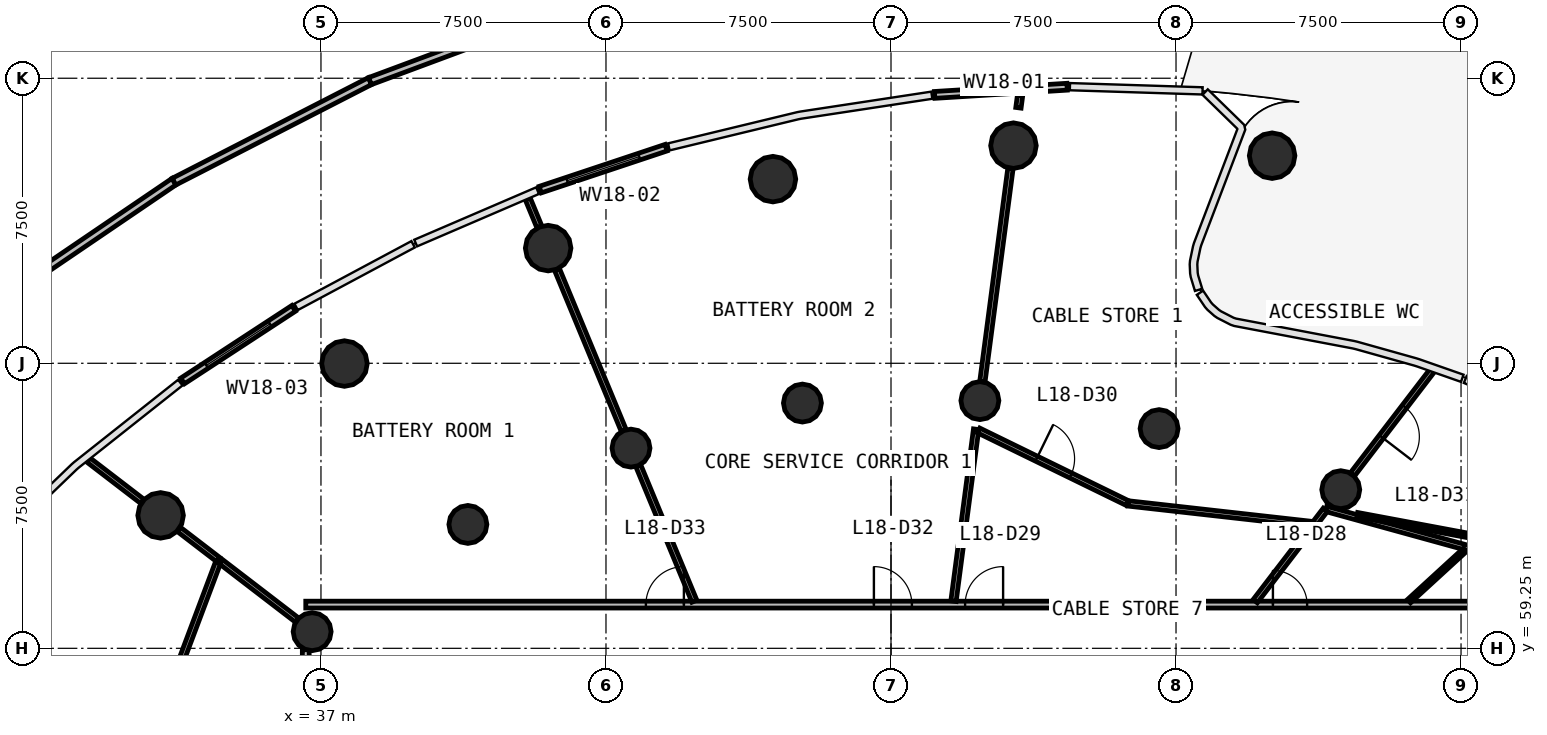
"""IFC4 building model, lengths in metres.
Left out: names, types, materials, properties, quantities, classifications, styles, units other than length and angle.
Written with IfcOpenShell. Run it as: python <this file> out.ifc"""

import sys

from ifc_helpers import new_model, si_unit, direction, frame, frame_2d, origin, origin_2d, place, context, subcontext, project, spatial, rectangle, circle, extrude, source, transform, mapped, element, fill, save


model = new_model("IFC4")
c1 = context("Model", 3, precision=1e-05, world=origin(), true_north=direction((0.0, 1.0)))
c2 = subcontext(c1, "Body", "Model", "MODEL_VIEW")
j1 = project(units=[si_unit("LENGTHUNIT", "METRE"), si_unit("PLANEANGLEUNIT", "RADIAN")], contexts=[c1])
p1 = place(None, origin())
s1 = spatial("IfcSite", under=j1, at=p1, CompositionType="ELEMENT")
p2 = place(p1, origin())
s2 = spatial("IfcBuilding", under=s1, at=p2, CompositionType="ELEMENT")
p3 = place(p2, frame((0.0, 0.0, 79.8)))
s3 = spatial("IfcBuildingStorey", under=s2, at=p3, CompositionType="ELEMENT", Elevation=79.8)
m1 = source(origin(), c2, "Body", "SweptSolid", [
    extrude(circle(Radius=0.6, at=origin_2d()), origin(), (0.0, 0.0, 1.0), 4.5),
])
for number, where, z_axis, x_axis in (
    (1, (62.029, 72.212, -0.4), (0.0, 0.0, 1.0), (1.0, 0.0, 0.0)),
    (2, (55.222, 72.477, -0.4), (0.0, 0.0, 1.0), (1.0, 0.0, 0.0)),
    (3, (48.894, 71.595, -0.4), (0.0, 0.0, 1.0), (1.0, 0.0, 0.0)),
    (4, (42.978, 69.781, -0.4), (0.0, 0.0, 1.0), (1.0, 0.0, 0.0)),
    (5, (37.618, 66.743, -0.4), (0.0, 0.0, 1.0), (1.0, 0.0, 0.0)),
    (6, (32.78, 62.748, -0.4), (0.0, 0.0, 1.0), (1.0, 0.0, 0.0)),
):
    element("IfcColumn", number, at=place(p3, frame(where, z_axis=z_axis, x_axis=x_axis)), inside=s3, PredefinedType="COLUMN", context=c2, shape_type="MappedRepresentation", body=[
        mapped(m1, transform((0.0, 0.0, 0.0), scale=1.0)),
    ])
m2 = source(origin(), c2, "Body", "SweptSolid", [
    extrude(circle(Radius=0.5, at=origin_2d()), origin(), (0.0, 0.0, 1.0), 4.1),
])
for number, where, z_axis, x_axis in (
    (7, (63.835, 63.424, 0.0), (0.0, 0.0, 1.0), (1.0, 0.0, 0.0)),
    (8, (59.055, 65.031, 0.0), (0.0, 0.0, 1.0), (1.0, 0.0, 0.0)),
    (9, (54.339, 65.767, 0.0), (0.0, 0.0, 1.0), (1.0, 0.0, 0.0)),
    (10, (49.669, 65.703, 0.0), (0.0, 0.0, 1.0), (1.0, 0.0, 0.0)),
    (11, (45.158, 64.518, 0.0), (0.0, 0.0, 1.0), (1.0, 0.0, 0.0)),
    (12, (40.866, 62.51, 0.0), (0.0, 0.0, 1.0), (1.0, 0.0, 0.0)),
    (13, (36.768, 59.688, 0.0), (0.0, 0.0, 1.0), (1.0, 0.0, 0.0)),
):
    element("IfcColumn", number, at=place(p3, frame(where, z_axis=z_axis, x_axis=x_axis)), inside=s3, PredefinedType="COLUMN", context=c2, shape_type="MappedRepresentation", body=[
        mapped(m2, transform((0.0, 0.0, 0.0), scale=1.0)),
    ])
p4 = place(p3, frame((56.634, 74.027, 0.0), z_axis=(0.0, 0.0, 1.0), x_axis=(-0.998087787894, -0.061812358449, 0.0)))
e14 = element("IfcWall", 14, at=p4, inside=s3, PredefinedType="STANDARD", context=c2, shape_type="SweptSolid", body=[
    extrude(rectangle(XDim=3.491, YDim=0.18, at=frame_2d((1.746, 0.0))), origin(), (0.0, 0.0, 1.0), 3.448),
])
p5 = place(p4, frame((0.746, 0.0, 0.9)))
e15 = element("IfcOpeningElement", 15, at=p5, cuts=e14, PredefinedType="OPENING", context=c2, shape_type="SweptSolid", body=[
    extrude(rectangle(XDim=2.0, YDim=2.2, at=frame_2d((1.0, 1.1))), frame((0.0, 0.1, 0.0), z_axis=(0.0, -1.0, 0.0), x_axis=(1.0, 0.0, 0.0)), (0.0, 0.0, 1.0), 0.2),
])
p6 = place(p3, frame((46.083, 72.423, 0.0), z_axis=(0.0, 0.0, 1.0), x_axis=(-0.948697281458, -0.316185812703, 0.0)))
e16 = element("IfcWall", 16, at=p6, inside=s3, PredefinedType="STANDARD", context=c2, shape_type="SweptSolid", body=[
    extrude(rectangle(XDim=3.492, YDim=0.18, at=frame_2d((1.746, 0.0))), origin(), (0.0, 0.0, 1.0), 3.7),
])
p7 = place(p6, frame((0.746, 0.0, 0.9)))
e17 = element("IfcOpeningElement", 17, at=p7, cuts=e16, PredefinedType="OPENING", context=c2, shape_type="SweptSolid", body=[
    extrude(rectangle(XDim=2.0, YDim=2.2, at=frame_2d((1.0, 1.1))), frame((0.0, 0.1, 0.0), z_axis=(0.0, -1.0, 0.0), x_axis=(1.0, 0.0, 0.0)), (0.0, 0.0, 1.0), 0.2),
])
p8 = place(p3, frame((36.282, 68.195, 0.0), z_axis=(0.0, 0.0, 1.0), x_axis=(-0.837092769451, -0.547060961258, 0.0)))
e18 = element("IfcWall", 18, at=p8, inside=s3, PredefinedType="STANDARD", context=c2, shape_type="SweptSolid", body=[
    extrude(rectangle(XDim=3.492, YDim=0.18, at=frame_2d((1.746, 0.0))), origin(), (0.0, 0.0, 1.0), 3.7),
])
p9 = place(p8, frame((0.746, 0.0, 0.9)))
e19 = element("IfcOpeningElement", 19, at=p9, cuts=e18, PredefinedType="OPENING", context=c2, shape_type="SweptSolid", body=[
    extrude(rectangle(XDim=2.0, YDim=2.2, at=frame_2d((1.0, 1.1))), frame((0.0, 0.1, 0.0), z_axis=(0.0, -1.0, 0.0), x_axis=(1.0, 0.0, 0.0)), (0.0, 0.0, 1.0), 0.2),
])
p10 = place(p3, frame((28.339, 68.272, 0.0), z_axis=(0.0, 0.0, 1.0), x_axis=(0.827164601212, 0.561959716085, 0.0)))
e20 = element("IfcWall", 20, at=p10, inside=s3, PredefinedType="PARAPET", context=c2, shape_type="SweptSolid", body=[
    extrude(rectangle(XDim=5.796, YDim=0.2, at=frame_2d((2.898, 0.0))), origin(), (0.0, 0.0, 1.0), 1.1),
])
p11 = place(p3, frame((33.133, 71.53, 0.0), z_axis=(0.0, 0.0, 1.0), x_axis=(0.889780183945, 0.456389334077, 0.0)))
e21 = element("IfcWall", 21, at=p11, inside=s3, PredefinedType="PARAPET", context=c2, shape_type="SweptSolid", body=[
    extrude(rectangle(XDim=5.796, YDim=0.2, at=frame_2d((2.898, 0.0))), origin(), (0.0, 0.0, 1.0), 1.1),
])
p12 = place(p3, frame((38.291, 74.175, 0.0), z_axis=(0.0, 0.0, 1.0), x_axis=(0.937325857348, 0.348454067486, 0.0)))
e22 = element("IfcWall", 22, at=p12, inside=s3, PredefinedType="PARAPET", context=c2, shape_type="SweptSolid", body=[
    extrude(rectangle(XDim=5.796, YDim=0.2, at=frame_2d((2.898, 0.0))), origin(), (0.0, 0.0, 1.0), 1.1),
])
p13 = place(p3, frame((36.6, 60.4, 0.0), z_axis=(0.0, 0.0, 1.0), x_axis=(1.0, 0.0, 0.0)))
e23 = element("IfcWall", 23, at=p13, inside=s3, PredefinedType="PARTITIONING", context=c2, shape_type="SweptSolid", body=[
    extrude(rectangle(XDim=30.8, YDim=0.18, at=frame_2d((15.4, 0.0))), origin(), (0.0, 0.0, 1.0), 2.9),
])
p14 = place(p13, frame((25.45, 0.0, 0.0)))
e24 = element("IfcOpeningElement", 24, at=p14, cuts=e23, PredefinedType="OPENING", context=c2, shape_type="SweptSolid", body=[
    extrude(rectangle(XDim=0.9, YDim=2.1, at=frame_2d((0.45, 1.05))), frame((0.0, 0.1, 0.0), z_axis=(0.0, -1.0, 0.0), x_axis=(1.0, 0.0, 0.0)), (0.0, 0.0, 1.0), 0.2),
])
p15 = place(p13, frame((17.35, 0.0, 0.0)))
e25 = element("IfcOpeningElement", 25, at=p15, cuts=e23, PredefinedType="OPENING", context=c2, shape_type="SweptSolid", body=[
    extrude(rectangle(XDim=1.0, YDim=2.1, at=frame_2d((0.5, 1.05))), frame((0.0, 0.1, 0.0), z_axis=(0.0, -1.0, 0.0), x_axis=(1.0, 0.0, 0.0)), (0.0, 0.0, 1.0), 0.2),
])
p16 = place(p13, frame((14.95, 0.0, 0.0)))
e26 = element("IfcOpeningElement", 26, at=p16, cuts=e23, PredefinedType="OPENING", context=c2, shape_type="SweptSolid", body=[
    extrude(rectangle(XDim=1.0, YDim=2.1, at=frame_2d((0.5, 1.05))), frame((0.0, 0.1, 0.0), z_axis=(0.0, -1.0, 0.0), x_axis=(1.0, 0.0, 0.0)), (0.0, 0.0, 1.0), 0.2),
])
p17 = place(p13, frame((8.95, 0.0, 0.0)))
e27 = element("IfcOpeningElement", 27, at=p17, cuts=e23, PredefinedType="OPENING", context=c2, shape_type="SweptSolid", body=[
    extrude(rectangle(XDim=1.0, YDim=2.1, at=frame_2d((0.5, 1.05))), frame((0.0, 0.1, 0.0), z_axis=(0.0, -1.0, 0.0), x_axis=(1.0, 0.0, 0.0)), (0.0, 0.0, 1.0), 0.2),
])
p18 = place(p3, frame((36.6, 35.63, 0.0), z_axis=(0.0, 0.0, 1.0), x_axis=(0.0, 1.0, 0.0)))
e28 = element("IfcWall", 28, at=p18, inside=s3, PredefinedType="PARTITIONING", context=c2, shape_type="SweptSolid", body=[
    extrude(rectangle(XDim=23.583, YDim=0.18, at=frame_2d((11.791, 0.0))), origin(), (0.0, 0.0, 1.0), 2.9),
])
p19 = place(p18, frame((11.333, 0.0, 0.0)))
e29 = element("IfcOpeningElement", 29, at=p19, cuts=e28, PredefinedType="OPENING", context=c2, shape_type="SweptSolid", body=[
    extrude(rectangle(XDim=1.0, YDim=2.1, at=frame_2d((0.5, 1.05))), frame((0.0, 0.1, 0.0), z_axis=(0.0, -1.0, 0.0), x_axis=(1.0, 0.0, 0.0)), (0.0, 0.0, 1.0), 0.2),
])
p20 = place(p18, frame((4.532, 0.0, 0.0)))
e30 = element("IfcOpeningElement", 30, at=p20, cuts=e28, PredefinedType="OPENING", context=c2, shape_type="SweptSolid", body=[
    extrude(rectangle(XDim=1.0, YDim=2.1, at=frame_2d((0.5, 1.05))), frame((0.0, 0.1, 0.0), z_axis=(0.0, -1.0, 0.0), x_axis=(1.0, 0.0, 0.0)), (0.0, 0.0, 1.0), 0.2),
])
p21 = place(p3, frame((69.33, 61.298, 0.0), z_axis=(0.0, 0.0, 1.0), x_axis=(-0.964096881201, 0.265550755334, 0.0)))
e31 = element("IfcWall", 31, at=p21, inside=s3, PredefinedType="PARTITIONING", context=c2, shape_type="SweptSolid", body=[
    extrude(rectangle(XDim=6.102, YDim=0.14, at=frame_2d((3.051, 0.0))), origin(), (0.0, 0.0, 1.0), 2.9),
])
p22 = place(p3, frame((34.315, 61.57, 0.0), z_axis=(0.0, 0.0, 1.0), x_axis=(-0.351670300138, -0.936123923421, 0.0)))
e32 = element("IfcWall", 32, at=p22, inside=s3, PredefinedType="PARTITIONING", context=c2, shape_type="SweptSolid", body=[
    extrude(rectangle(XDim=5.772, YDim=0.14, at=frame_2d((2.886, 0.0))), origin(), (0.0, 0.0, 1.0), 2.9),
])
p23 = place(p3, frame((54.405, 66.267, 0.0), z_axis=(0.0, 0.0, 1.0), x_axis=(0.130510314557, 0.991446951578, 0.0)))
e33 = element("IfcWall", 33, at=p23, inside=s3, PredefinedType="PARTITIONING", context=c2, shape_type="SweptSolid", body=[
    extrude(rectangle(XDim=5.659, YDim=0.14, at=frame_2d((2.829, 0.0))), origin(), (0.0, 0.0, 1.0), 2.9),
])
p24 = place(p3, frame((63.136, 62.513, 0.0), z_axis=(0.0, 0.0, 1.0), x_axis=(-0.993761689461, 0.111524457223, 0.0)))
e34 = element("IfcWall", 34, at=p24, inside=s3, PredefinedType="PARTITIONING", context=c2, shape_type="SweptSolid", body=[
    extrude(rectangle(XDim=4.928, YDim=0.14, at=frame_2d((2.464, 0.0))), origin(), (0.0, 0.0, 1.0), 2.9),
])
p25 = place(p3, frame((53.644, 60.49, 0.0), z_axis=(0.0, 0.0, 1.0), x_axis=(0.130530623125, 0.991444278024, 0.0)))
e35 = element("IfcWall", 35, at=p25, inside=s3, PredefinedType="PARTITIONING", context=c2, shape_type="SweptSolid", body=[
    extrude(rectangle(XDim=4.564, YDim=0.14, at=frame_2d((2.282, 0.0))), origin(), (0.0, 0.0, 1.0), 2.9),
])
p26 = place(p3, frame((44.965, 64.984, 0.0), z_axis=(0.0, 0.0, 1.0), x_axis=(-0.382705930348, 0.923870213221, 0.0)))
e36 = element("IfcWall", 36, at=p26, inside=s3, PredefinedType="PARTITIONING", context=c2, shape_type="SweptSolid", body=[
    extrude(rectangle(XDim=4.587, YDim=0.14, at=frame_2d((2.293, 0.0))), origin(), (0.0, 0.0, 1.0), 2.9),
])
p27 = place(p3, frame((54.306, 64.982, 0.0), z_axis=(0.0, 0.0, 1.0), x_axis=(0.898688532704, -0.438587415673, 0.0)))
e37 = element("IfcWall", 37, at=p27, inside=s3, PredefinedType="PARTITIONING", context=c2, shape_type="SweptSolid", body=[
    extrude(rectangle(XDim=4.346, YDim=0.14, at=frame_2d((2.173, 0.0))), origin(), (0.0, 0.0, 1.0), 2.9),
])
p28 = place(p27, frame((1.696, 0.0, 0.0)))
e38 = element("IfcOpeningElement", 38, at=p28, cuts=e37, PredefinedType="OPENING", context=c2, shape_type="SweptSolid", body=[
    extrude(rectangle(XDim=1.0, YDim=2.1, at=frame_2d((0.5, 1.05))), frame((0.0, 0.08, 0.0), z_axis=(0.0, -1.0, 0.0), x_axis=(1.0, 0.0, 0.0)), (0.0, 0.0, 1.0), 0.16),
])
p29 = place(p3, frame((46.826, 60.49, 0.0), z_axis=(0.0, 0.0, 1.0), x_axis=(-0.382644558062, 0.923895633817, 0.0)))
e39 = element("IfcWall", 39, at=p29, inside=s3, PredefinedType="PARTITIONING", context=c2, shape_type="SweptSolid", body=[
    extrude(rectangle(XDim=3.854, YDim=0.14, at=frame_2d((1.927, 0.0))), origin(), (0.0, 0.0, 1.0), 2.9),
])
p30 = place(p3, frame((66.251, 66.572, 0.0), z_axis=(0.0, 0.0, 1.0), x_axis=(-0.608759983823, -0.793354449219, 0.0)))
e40 = element("IfcWall", 40, at=p30, inside=s3, PredefinedType="PARTITIONING", context=c2, shape_type="SweptSolid", body=[
    extrude(rectangle(XDim=3.464, YDim=0.14, at=frame_2d((1.732, 0.0))), origin(), (0.0, 0.0, 1.0), 2.9),
])
p31 = place(p30, frame((1.214, 0.0, 0.0)))
e41 = element("IfcOpeningElement", 41, at=p31, cuts=e40, PredefinedType="OPENING", context=c2, shape_type="SweptSolid", body=[
    extrude(rectangle(XDim=1.0, YDim=2.1, at=frame_2d((0.5, 1.05))), frame((0.0, 0.08, 0.0), z_axis=(0.0, -1.0, 0.0), x_axis=(1.0, 0.0, 0.0)), (0.0, 0.0, 1.0), 0.16),
])
p32 = place(p3, frame((61.584, 60.49, 0.0), z_axis=(0.0, 0.0, 1.0), x_axis=(0.608715994439, 0.793388201396, 0.0)))
e42 = element("IfcWall", 42, at=p32, inside=s3, PredefinedType="PARTITIONING", context=c2, shape_type="SweptSolid", body=[
    extrude(rectangle(XDim=2.468, YDim=0.14, at=frame_2d((1.234, 0.0))), origin(), (0.0, 0.0, 1.0), 2.9),
])
p33 = place(p3, frame((36.367, 59.995, 0.0), z_axis=(0.0, 0.0, 1.0), x_axis=(-0.793342057606, 0.608776132609, 0.0)))
e43 = element("IfcWall", 43, at=p33, inside=s3, PredefinedType="PARTITIONING", context=c2, shape_type="SweptSolid", body=[
    extrude(rectangle(XDim=2.513, YDim=0.14, at=frame_2d((1.257, 0.0))), origin(), (0.0, 0.0, 1.0), 2.9),
])
p34 = place(p3, frame((32.301, 63.116, 0.0), z_axis=(0.0, 0.0, 1.0), x_axis=(-0.793353764311, 0.608760876415, 0.0)))
e44 = element("IfcWall", 44, at=p34, inside=s3, PredefinedType="PARTITIONING", context=c2, shape_type="SweptSolid", body=[
    extrude(rectangle(XDim=1.79, YDim=0.14, at=frame_2d((0.895, 0.0))), origin(), (0.0, 0.0, 1.0), 2.9),
])
p35 = place(p3, frame((34.292, 61.588, 0.0), z_axis=(0.0, 0.0, 1.0), x_axis=(-0.793397863959, 0.608703400241, 0.0)))
e45 = element("IfcWall", 45, at=p35, inside=s3, PredefinedType="PARTITIONING", context=c2, shape_type="SweptSolid", body=[
    extrude(rectangle(XDim=1.301, YDim=0.14, at=frame_2d((0.65, 0.0))), origin(), (0.0, 0.0, 1.0), 2.9),
])
p36 = place(p3, frame((55.354, 73.473, 0.0), z_axis=(0.0, 0.0, 1.0), x_axis=(0.130608081992, 0.99143407694, 0.0)))
e46 = element("IfcWall", 46, at=p36, inside=s3, PredefinedType="PARTITIONING", context=c2, shape_type="SweptSolid", body=[
    extrude(rectangle(XDim=0.329, YDim=0.14, at=frame_2d((0.165, 0.0))), origin(), (0.0, 0.0, 1.0), 2.9),
])
p37 = place(p3, frame((42.747, 70.34, 0.0), z_axis=(0.0, 0.0, 1.0), x_axis=(-0.38272164666, 0.923863702706, 0.0)))
e47 = element("IfcWall", 47, at=p37, inside=s3, PredefinedType="PARTITIONING", context=c2, shape_type="SweptSolid", body=[
    extrude(rectangle(XDim=0.797, YDim=0.14, at=frame_2d((0.398, 0.0))), origin(), (0.0, 0.0, 1.0), 2.9),
])
p38 = place(p3, frame((63.155, 62.537, 0.0), z_axis=(0.0, 0.0, 1.0), x_axis=(0.608795024316, 0.793327560575, 0.0)))
e48 = element("IfcWall", 48, at=p38, inside=s3, PredefinedType="PARTITIONING", context=c2, shape_type="SweptSolid", body=[
    extrude(rectangle(XDim=0.451, YDim=0.14, at=frame_2d((0.226, 0.0))), origin(), (0.0, 0.0, 1.0), 2.9),
])
p39 = place(p3, frame((67.461, 62.168, 0.0), z_axis=(0.0, 0.0, 1.0), x_axis=(-0.982952931866, 0.183857373354, 0.0)))
e49 = element("IfcWall", 49, at=p39, inside=s3, PredefinedType="PARTITIONING", context=c2, shape_type="SweptSolid", body=[
    extrude(rectangle(XDim=3.248, YDim=0.12, at=frame_2d((1.624, 0.0))), origin(), (0.0, 0.0, 1.0), 2.9),
])
p40 = place(p3, frame((65.63, 60.49, 0.0), z_axis=(0.0, 0.0, 1.0), x_axis=(0.737245484637, 0.675624966518, 0.0)))
e50 = element("IfcWall", 50, at=p40, inside=s3, PredefinedType="PARTITIONING", context=c2, shape_type="SweptSolid", body=[
    extrude(rectangle(XDim=1.997, YDim=0.12, at=frame_2d((0.999, 0.0))), origin(), (0.0, 0.0, 1.0), 2.9),
])
m3 = source(origin(), c2, "Body", "SweptSolid", [
    extrude(rectangle(XDim=2.0, YDim=2.2, at=frame_2d((1.0, 1.1))), frame((0.0, 0.03, 0.0), z_axis=(0.0, -1.0, 0.0), x_axis=(1.0, 0.0, 0.0)), (0.0, 0.0, 1.0), 0.06),
])
p41 = place(p5, origin())
e51 = element("IfcWindow", 51, at=p41, inside=s3, PartitioningType="SINGLE_PANEL", PredefinedType="WINDOW", context=c2, shape_type="MappedRepresentation", body=[
    mapped(m3, transform((0.0, 0.0, 0.0), scale=1.0)),
])
fill(e15, e51)
p42 = place(p7, origin())
e52 = element("IfcWindow", 52, at=p42, inside=s3, PartitioningType="SINGLE_PANEL", PredefinedType="WINDOW", context=c2, shape_type="MappedRepresentation", body=[
    mapped(m3, transform((0.0, 0.0, 0.0), scale=1.0)),
])
fill(e17, e52)
p43 = place(p9, origin())
e53 = element("IfcWindow", 53, at=p43, inside=s3, PartitioningType="SINGLE_PANEL", PredefinedType="WINDOW", context=c2, shape_type="MappedRepresentation", body=[
    mapped(m3, transform((0.0, 0.0, 0.0), scale=1.0)),
])
fill(e19, e53)
m4 = source(origin(), c2, "Body", "SweptSolid", [
    extrude(rectangle(XDim=0.9, YDim=2.1, at=frame_2d((0.45, 1.05))), frame((0.0, 0.025, 0.0), z_axis=(0.0, -1.0, 0.0), x_axis=(1.0, 0.0, 0.0)), (0.0, 0.0, 1.0), 0.05),
])
p44 = place(p14, origin())
e54 = element("IfcDoor", 54, at=p44, inside=s3, OperationType="SINGLE_SWING_LEFT", PredefinedType="DOOR", context=c2, shape_type="MappedRepresentation", body=[
    mapped(m4, transform((0.0, 0.0, 0.0), scale=1.0)),
])
fill(e24, e54)
m5 = source(origin(), c2, "Body", "SweptSolid", [
    extrude(rectangle(XDim=1.0, YDim=2.1, at=frame_2d((0.5, 1.05))), frame((0.0, 0.025, 0.0), z_axis=(0.0, -1.0, 0.0), x_axis=(1.0, 0.0, 0.0)), (0.0, 0.0, 1.0), 0.05),
])
p45 = place(p15, origin())
e55 = element("IfcDoor", 55, at=p45, inside=s3, OperationType="SINGLE_SWING_RIGHT", PredefinedType="DOOR", context=c2, shape_type="MappedRepresentation", body=[
    mapped(m5, transform((0.0, 0.0, 0.0), scale=1.0)),
])
fill(e25, e55)
p46 = place(p28, origin())
e56 = element("IfcDoor", 56, at=p46, inside=s3, OperationType="SINGLE_SWING_LEFT", PredefinedType="DOOR", context=c2, shape_type="MappedRepresentation", body=[
    mapped(m5, transform((0.0, 0.0, 0.0), scale=1.0)),
])
fill(e38, e56)
p47 = place(p31, origin())
e57 = element("IfcDoor", 57, at=p47, inside=s3, OperationType="SINGLE_SWING_RIGHT", PredefinedType="DOOR", context=c2, shape_type="MappedRepresentation", body=[
    mapped(m5, transform((0.0, 0.0, 0.0), scale=1.0)),
])
fill(e41, e57)
p48 = place(p16, origin())
e58 = element("IfcDoor", 58, at=p48, inside=s3, OperationType="SINGLE_SWING_LEFT", PredefinedType="DOOR", context=c2, shape_type="MappedRepresentation", body=[
    mapped(m5, transform((0.0, 0.0, 0.0), scale=1.0)),
])
fill(e26, e58)
p49 = place(p17, origin())
e59 = element("IfcDoor", 59, at=p49, inside=s3, OperationType="SINGLE_SWING_RIGHT", PredefinedType="DOOR", context=c2, shape_type="MappedRepresentation", body=[
    mapped(m5, transform((0.0, 0.0, 0.0), scale=1.0)),
])
fill(e27, e59)
save(model, sys.argv[1])
